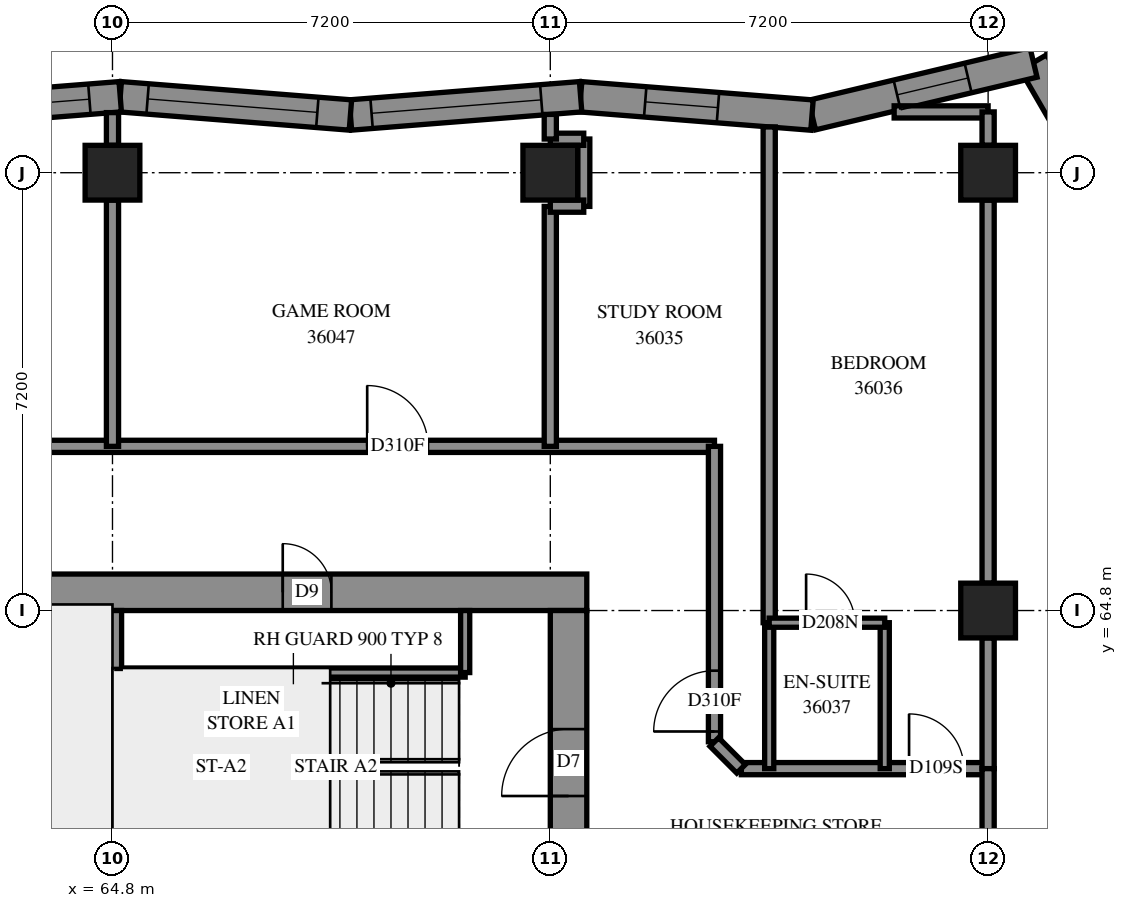
"""IFC4 building model, lengths in metres.
Left out: names, types, materials, properties, quantities, classifications, styles, units other than length and angle.
Written with IfcOpenShell. Run it as: python <this file> out.ifc"""

import sys

from ifc_helpers import new_model, si_unit, direction, frame, frame_2d, origin, origin_2d, place, context, subcontext, project, spatial, polyline, rectangle, outline, extrude, element, fill, save


model = new_model("IFC4")
c1 = context("Model", 3, precision=1e-05, world=origin(), true_north=direction((0.0, 1.0)))
c2 = subcontext(c1, "Body", "Model", "MODEL_VIEW")
j1 = project(units=[si_unit("LENGTHUNIT", "METRE"), si_unit("PLANEANGLEUNIT", "RADIAN")], contexts=[c1])
p1 = place(None, origin())
s1 = spatial("IfcSite", under=j1, at=p1, CompositionType="ELEMENT")
p2 = place(p1, origin())
s2 = spatial("IfcBuilding", under=s1, at=p2, CompositionType="ELEMENT")
p3 = place(p2, frame((0.0, 0.0, 135.4)))
s3 = spatial("IfcBuildingStorey", under=s2, at=p3, CompositionType="ELEMENT", Elevation=135.4)
for number, where, z_axis, x_axis in (
    (1, (64.8, 72.0, 0.0), (0.0, 0.0, 1.0), (1.0, 0.0, 0.0)),
    (2, (72.0, 72.0, 0.0), (0.0, 0.0, 1.0), (1.0, 0.0, 0.0)),
    (3, (79.2, 64.8, 0.0), (0.0, 0.0, 1.0), (1.0, 0.0, 0.0)),
    (4, (79.2, 72.0, 0.0), (0.0, 0.0, 1.0), (1.0, 0.0, 0.0)),
):
    element("IfcColumn", number, at=place(p3, frame(where, z_axis=z_axis, x_axis=x_axis)), inside=s3, PredefinedType="COLUMN", context=c2, shape_type="SweptSolid", body=[
        extrude(rectangle(XDim=0.9, YDim=0.9, at=origin_2d()), origin(), (0.0, 0.0, 1.0), 3.1),
    ])
p4 = place(p3, frame((57.0, 65.1, -0.3), z_axis=(0.0, 0.0, 1.0), x_axis=(1.0, 0.0, 0.0)))
e5 = element("IfcWall", 5, at=p4, inside=s3, PredefinedType="SHEAR", context=c2, shape_type="SweptSolid", body=[
    extrude(rectangle(XDim=15.6, YDim=0.6, at=frame_2d((7.8, 0.0))), origin(), (0.0, 0.0, 1.0), 2.7),
])
p5 = place(p4, frame((10.6, 0.0, 0.3)))
e6 = element("IfcOpeningElement", 6, at=p5, cuts=e5, PredefinedType="OPENING", context=c2, shape_type="SweptSolid", body=[
    extrude(rectangle(XDim=0.8, YDim=2.1, at=frame_2d((0.4, 1.05))), frame((0.0, 0.31, 0.0), z_axis=(0.0, -1.0, 0.0), x_axis=(1.0, 0.0, 0.0)), (0.0, 0.0, 1.0), 0.62),
])
p6 = place(p3, frame((72.3, 50.4, -0.3), z_axis=(0.0, 0.0, 1.0), x_axis=(0.0, 1.0, 0.0)))
e7 = element("IfcWall", 7, at=p6, inside=s3, PredefinedType="SHEAR", context=c2, shape_type="SweptSolid", body=[
    extrude(rectangle(XDim=14.4, YDim=0.6, at=frame_2d((7.2, 0.0))), origin(), (0.0, 0.0, 1.0), 2.7),
])
p7 = place(p6, frame((4.55, 0.0, 0.3)))
e8 = element("IfcOpeningElement", 8, at=p7, cuts=e7, PredefinedType="OPENING", context=c2, shape_type="SweptSolid", body=[
    extrude(rectangle(XDim=1.1, YDim=2.1, at=frame_2d((0.55, 1.05))), frame((0.0, 0.31, 0.0), z_axis=(0.0, -1.0, 0.0), x_axis=(1.0, 0.0, 0.0)), (0.0, 0.0, 1.0), 0.62),
])
p8 = place(p6, frame((11.35, 0.0, 0.3)))
e9 = element("IfcOpeningElement", 9, at=p8, cuts=e7, PredefinedType="OPENING", context=c2, shape_type="SweptSolid", body=[
    extrude(rectangle(XDim=1.1, YDim=2.1, at=frame_2d((0.55, 1.05))), frame((0.0, 0.31, 0.0), z_axis=(0.0, -1.0, 0.0), x_axis=(1.0, 0.0, 0.0)), (0.0, 0.0, 1.0), 0.62),
])
p9 = place(p3, frame((64.8, 60.6, 0.0), z_axis=(0.0, 0.0, 1.0), x_axis=(0.0, 1.0, 0.0)))
e10 = element("IfcWall", 10, at=p9, inside=s3, PredefinedType="SOLIDWALL", context=c2, shape_type="SweptSolid", body=[
    extrude(rectangle(XDim=4.2, YDim=0.3, at=frame_2d((2.1, 0.0))), origin(), (0.0, 0.0, 1.0), 3.1),
])
p10 = place(p3, frame((81.624, 70.915, 0.0), z_axis=(0.0, 0.0, 1.0), x_axis=(-0.500878516, 0.8655175979, 0.0)))
e11 = element("IfcWall", 11, at=p10, inside=s3, PredefinedType="SOLIDWALL", context=c2, shape_type="SweptSolid", body=[
    extrude(outline(polyline([(0.044, -0.25), (3.535, -0.25), (3.163, 0.25), (-0.044, 0.25), (0.044, -0.25)])), origin(), (0.0, 0.0, 1.0), 3.1),
])
p11 = place(p10, frame((0.784, 0.0, 0.45)))
e12 = element("IfcOpeningElement", 12, at=p11, cuts=e11, PredefinedType="OPENING", context=c2, shape_type="SweptSolid", body=[
    extrude(rectangle(XDim=1.2, YDim=2.5, at=frame_2d((0.6, 1.25))), frame((0.0, 0.26, 0.0), z_axis=(0.0, -1.0, 0.0), x_axis=(1.0, 0.0, 0.0)), (0.0, 0.0, 1.0), 0.52),
])
p12 = place(p3, frame((79.947, 73.814, 0.0), z_axis=(0.0, 0.0, 1.0), x_axis=(-0.9728878208, -0.2312775132, 0.0)))
e13 = element("IfcWall", 13, at=p12, inside=s3, PredefinedType="SOLIDWALL", context=c2, shape_type="SweptSolid", body=[
    extrude(outline(polyline([(-0.186, -0.25), (3.705, -0.25), (3.784, 0.25), (0.186, 0.25), (-0.186, -0.25)])), origin(), (0.0, 0.0, 1.0), 3.1),
])
p13 = place(p12, frame((1.106, 0.0, 0.45)))
e14 = element("IfcOpeningElement", 14, at=p13, cuts=e13, PredefinedType="OPENING", context=c2, shape_type="SweptSolid", body=[
    extrude(rectangle(XDim=1.2, YDim=2.5, at=frame_2d((0.6, 1.25))), frame((0.0, 0.26, 0.0), z_axis=(0.0, -1.0, 0.0), x_axis=(1.0, 0.0, 0.0)), (0.0, 0.0, 1.0), 0.52),
])
p14 = place(p3, frame((76.304, 72.948, 0.0), z_axis=(0.0, 0.0, 1.0), x_axis=(-0.9968755515, 0.0789881945, 0.0)))
e15 = element("IfcWall", 15, at=p14, inside=s3, PredefinedType="SOLIDWALL", context=c2, shape_type="SweptSolid", body=[
    extrude(outline(polyline([(0.039, -0.25), (3.837, -0.25), (3.797, 0.25), (-0.039, 0.25), (0.039, -0.25)])), origin(), (0.0, 0.0, 1.0), 3.1),
])
p15 = place(p14, frame((1.552, 0.0, 0.45)))
e16 = element("IfcOpeningElement", 16, at=p15, cuts=e15, PredefinedType="OPENING", context=c2, shape_type="SweptSolid", body=[
    extrude(rectangle(XDim=1.2, YDim=2.5, at=frame_2d((0.6, 1.25))), frame((0.0, 0.26, 0.0), z_axis=(0.0, -1.0, 0.0), x_axis=(1.0, 0.0, 0.0)), (0.0, 0.0, 1.0), 0.52),
])
p16 = place(p3, frame((72.499, 73.249, 0.0), z_axis=(0.0, 0.0, 1.0), x_axis=(-0.9968747806, -0.0789979222, 0.0)))
e17 = element("IfcWall", 17, at=p16, inside=s3, PredefinedType="SOLIDWALL", context=c2, shape_type="SweptSolid", body=[
    extrude(outline(polyline([(-0.02, -0.25), (3.778, -0.25), (3.817, 0.25), (0.02, 0.25), (-0.02, -0.25)])), origin(), (0.0, 0.0, 1.0), 3.1),
])
p17 = place(p16, frame((0.649, 0.0, 0.45)))
e18 = element("IfcOpeningElement", 18, at=p17, cuts=e17, PredefinedType="OPENING", context=c2, shape_type="SweptSolid", body=[
    extrude(rectangle(XDim=2.8, YDim=2.5, at=frame_2d((1.4, 1.25))), frame((0.0, 0.26, 0.0), z_axis=(0.0, -1.0, 0.0), x_axis=(1.0, 0.0, 0.0)), (0.0, 0.0, 1.0), 0.52),
])
p18 = place(p3, frame((68.713, 72.949, 0.0), z_axis=(0.0, 0.0, 1.0), x_axis=(-0.9968746163, 0.078999996, 0.0)))
e19 = element("IfcWall", 19, at=p18, inside=s3, PredefinedType="SOLIDWALL", context=c2, shape_type="SweptSolid", body=[
    extrude(outline(polyline([(0.02, -0.25), (3.817, -0.25), (3.778, 0.25), (-0.02, 0.25), (0.02, -0.25)])), origin(), (0.0, 0.0, 1.0), 3.1),
])
p19 = place(p18, frame((0.546, 0.0, 0.45)))
e20 = element("IfcOpeningElement", 20, at=p19, cuts=e19, PredefinedType="OPENING", context=c2, shape_type="SweptSolid", body=[
    extrude(rectangle(XDim=2.8, YDim=2.5, at=frame_2d((1.4, 1.25))), frame((0.0, 0.26, 0.0), z_axis=(0.0, -1.0, 0.0), x_axis=(1.0, 0.0, 0.0)), (0.0, 0.0, 1.0), 0.52),
])
p20 = place(p3, frame((64.927, 73.249, 0.0), z_axis=(0.0, 0.0, 1.0), x_axis=(-0.9968746163, -0.078999996, 0.0)))
e21 = element("IfcWall", 21, at=p20, inside=s3, PredefinedType="SOLIDWALL", context=c2, shape_type="SweptSolid", body=[
    extrude(outline(polyline([(-0.02, -0.25), (3.778, -0.25), (3.817, 0.25), (0.02, 0.25), (-0.02, -0.25)])), origin(), (0.0, 0.0, 1.0), 3.1),
])
p21 = place(p20, frame((0.509, 0.0, 0.45)))
e22 = element("IfcOpeningElement", 22, at=p21, cuts=e21, PredefinedType="OPENING", context=c2, shape_type="SweptSolid", body=[
    extrude(rectangle(XDim=2.8, YDim=2.5, at=frame_2d((1.4, 1.25))), frame((0.0, 0.26, 0.0), z_axis=(0.0, -1.0, 0.0), x_axis=(1.0, 0.0, 0.0)), (0.0, 0.0, 1.0), 0.52),
])
p22 = place(p3, frame((64.95, 63.78, 0.0), z_axis=(0.0, 0.0, 1.0), x_axis=(1.0, 0.0, 0.0)))
e23 = element("IfcWall", 23, at=p22, inside=s3, PredefinedType="PARTITIONING", context=c2, shape_type="SweptSolid", body=[
    extrude(rectangle(XDim=5.65, YDim=0.15, at=frame_2d((2.825, 0.0))), origin(), (0.0, 0.0, 1.0), 3.1),
])
p23 = place(p3, frame((70.6, 63.78, 0.0), z_axis=(0.0, 0.0, 1.0), x_axis=(0.0, 1.0, 0.0)))
e24 = element("IfcWall", 24, at=p23, inside=s3, PredefinedType="PARTITIONING", context=c2, shape_type="SweptSolid", body=[
    extrude(rectangle(XDim=1.02, YDim=0.15, at=frame_2d((0.51, 0.0))), origin(), (0.0, 0.0, 1.0), 3.1),
])
p24 = place(p3, frame((54.9, 67.5, 0.0), z_axis=(0.0, 0.0, 1.0), x_axis=(1.0, 0.0, 0.0)))
e25 = element("IfcWall", 25, at=p24, inside=s3, PredefinedType="PARTITIONING", context=c2, shape_type="SweptSolid", body=[
    extrude(rectangle(XDim=19.8, YDim=0.2, at=frame_2d((9.9, 0.0))), origin(), (0.0, 0.0, 1.0), 3.1),
])
p25 = place(p24, frame((6.562, 0.0, 0.0)))
e26 = element("IfcOpeningElement", 26, at=p25, cuts=e25, PredefinedType="OPENING", context=c2, shape_type="SweptSolid", body=[
    extrude(rectangle(XDim=1.0, YDim=2.1, at=frame_2d((0.5, 1.05))), frame((0.0, 0.11, 0.0), z_axis=(0.0, -1.0, 0.0), x_axis=(1.0, 0.0, 0.0)), (0.0, 0.0, 1.0), 0.22),
])
p26 = place(p24, frame((14.089, 0.0, 0.0)))
e27 = element("IfcOpeningElement", 27, at=p26, cuts=e25, PredefinedType="OPENING", context=c2, shape_type="SweptSolid", body=[
    extrude(rectangle(XDim=1.0, YDim=2.1, at=frame_2d((0.5, 1.05))), frame((0.0, 0.11, 0.0), z_axis=(0.0, -1.0, 0.0), x_axis=(1.0, 0.0, 0.0)), (0.0, 0.0, 1.0), 0.22),
])
p27 = place(p3, frame((75.6, 64.6, 0.0), z_axis=(0.0, 0.0, 1.0), x_axis=(0.0, 1.0, 0.0)))
e28 = element("IfcWall", 28, at=p27, inside=s3, PredefinedType="PARTITIONING", context=c2, shape_type="SweptSolid", body=[
    extrude(rectangle(XDim=8.153, YDim=0.2, at=frame_2d((4.076, 0.0))), origin(), (0.0, 0.0, 1.0), 3.1),
])
p28 = place(p3, frame((79.2, 65.25, 0.0), z_axis=(0.0, 0.0, 1.0), x_axis=(0.0, 1.0, 0.0)))
e29 = element("IfcWall", 29, at=p28, inside=s3, PredefinedType="PARTITIONING", context=c2, shape_type="SweptSolid", body=[
    extrude(rectangle(XDim=6.3, YDim=0.2, at=frame_2d((3.15, 0.0))), origin(), (0.0, 0.0, 1.0), 3.1),
])
p29 = place(p3, frame((74.7, 62.642, 0.0), z_axis=(0.0, 0.0, 1.0), x_axis=(0.0, 1.0, 0.0)))
e30 = element("IfcWall", 30, at=p29, inside=s3, PredefinedType="PARTITIONING", context=c2, shape_type="SweptSolid", body=[
    extrude(rectangle(XDim=4.858, YDim=0.2, at=frame_2d((2.429, 0.0))), origin(), (0.0, 0.0, 1.0), 3.1),
])
p30 = place(p29, frame((0.169, 0.0, 0.0)))
e31 = element("IfcOpeningElement", 31, at=p30, cuts=e30, PredefinedType="OPENING", context=c2, shape_type="SweptSolid", body=[
    extrude(rectangle(XDim=1.0, YDim=2.1, at=frame_2d((0.5, 1.05))), frame((0.0, 0.11, 0.0), z_axis=(0.0, -1.0, 0.0), x_axis=(1.0, 0.0, 0.0)), (0.0, 0.0, 1.0), 0.22),
])
p31 = place(p3, frame((75.142, 62.2, 0.0), z_axis=(0.0, 0.0, 1.0), x_axis=(1.0, 0.0, 0.0)))
e32 = element("IfcWall", 32, at=p31, inside=s3, PredefinedType="PARTITIONING", context=c2, shape_type="SweptSolid", body=[
    extrude(rectangle(XDim=4.058, YDim=0.2, at=frame_2d((2.029, 0.0))), origin(), (0.0, 0.0, 1.0), 3.1),
])
p32 = place(p31, frame((2.758, 0.0, 0.0)))
e33 = element("IfcOpeningElement", 33, at=p32, cuts=e32, PredefinedType="OPENING", context=c2, shape_type="SweptSolid", body=[
    extrude(rectangle(XDim=0.9, YDim=2.1, at=frame_2d((0.45, 1.05))), frame((0.0, 0.11, 0.0), z_axis=(0.0, -1.0, 0.0), x_axis=(1.0, 0.0, 0.0)), (0.0, 0.0, 1.0), 0.22),
])
p33 = place(p3, frame((64.8, 67.5, 0.0), z_axis=(0.0, 0.0, 1.0), x_axis=(0.0, 1.0, 0.0)))
e34 = element("IfcWall", 34, at=p33, inside=s3, PredefinedType="PARTITIONING", context=c2, shape_type="SweptSolid", body=[
    extrude(rectangle(XDim=4.05, YDim=0.2, at=frame_2d((2.025, 0.0))), origin(), (0.0, 0.0, 1.0), 3.1),
])
p34 = place(p3, frame((72.0, 67.5, 0.0), z_axis=(0.0, 0.0, 1.0), x_axis=(0.0, 1.0, 0.0)))
e35 = element("IfcWall", 35, at=p34, inside=s3, PredefinedType="PARTITIONING", context=c2, shape_type="SweptSolid", body=[
    extrude(rectangle(XDim=3.946, YDim=0.2, at=frame_2d((1.973, 0.0))), origin(), (0.0, 0.0, 1.0), 3.1),
])
for number, where, z_axis, x_axis in (
    (36, (75.6, 62.2, 0.0), (0.0, 0.0, 1.0), (0.0, 1.0, 0.0)),
    (37, (77.5, 62.2, 0.0), (0.0, 0.0, 1.0), (0.0, 1.0, 0.0)),
):
    element("IfcWall", number, at=place(p3, frame(where, z_axis=z_axis, x_axis=x_axis)), inside=s3, PredefinedType="PARTITIONING", context=c2, shape_type="SweptSolid", body=[
        extrude(rectangle(XDim=2.4, YDim=0.15, at=frame_2d((1.2, 0.0))), origin(), (0.0, 0.0, 1.0), 3.1),
    ])
p35 = place(p3, frame((79.2, 62.2, 0.0), z_axis=(0.0, 0.0, 1.0), x_axis=(0.0, 1.0, 0.0)))
e38 = element("IfcWall", 38, at=p35, inside=s3, PredefinedType="PARTITIONING", context=c2, shape_type="SweptSolid", body=[
    extrude(rectangle(XDim=2.15, YDim=0.2, at=frame_2d((1.075, 0.0))), origin(), (0.0, 0.0, 1.0), 3.1),
])
p36 = place(p3, frame((79.2, 60.2, 0.0), z_axis=(0.0, 0.0, 1.0), x_axis=(0.0, 1.0, 0.0)))
e39 = element("IfcWall", 39, at=p36, inside=s3, PredefinedType="PARTITIONING", context=c2, shape_type="SweptSolid", body=[
    extrude(rectangle(XDim=2.0, YDim=0.2, at=frame_2d((1.0, 0.0))), origin(), (0.0, 0.0, 1.0), 3.1),
])
p37 = place(p3, frame((75.6, 64.6, 0.0), z_axis=(0.0, 0.0, 1.0), x_axis=(1.0, 0.0, 0.0)))
e40 = element("IfcWall", 40, at=p37, inside=s3, PredefinedType="PARTITIONING", context=c2, shape_type="SweptSolid", body=[
    extrude(rectangle(XDim=1.9, YDim=0.15, at=frame_2d((0.95, 0.0))), origin(), (0.0, 0.0, 1.0), 3.1),
])
p38 = place(p37, frame((0.607, 0.0, 0.0)))
e41 = element("IfcOpeningElement", 41, at=p38, cuts=e40, PredefinedType="OPENING", context=c2, shape_type="SweptSolid", body=[
    extrude(rectangle(XDim=0.8, YDim=2.1, at=frame_2d((0.4, 1.05))), frame((0.0, 0.085, 0.0), z_axis=(0.0, -1.0, 0.0), x_axis=(1.0, 0.0, 0.0)), (0.0, 0.0, 1.0), 0.17),
])
p39 = place(p3, frame((77.655, 73.0, 0.0), z_axis=(0.0, 0.0, 1.0), x_axis=(1.0, 0.0, 0.0)))
e42 = element("IfcWall", 42, at=p39, inside=s3, PredefinedType="PARTITIONING", context=c2, shape_type="SweptSolid", body=[
    extrude(rectangle(XDim=1.545, YDim=0.2, at=frame_2d((0.773, 0.0))), origin(), (0.0, 0.0, 1.0), 3.1),
])
p40 = place(p3, frame((72.55, 71.446, 0.0), z_axis=(0.0, 0.0, 1.0), x_axis=(0.0, 1.0, 0.0)))
e43 = element("IfcWall", 43, at=p40, inside=s3, PredefinedType="PARTITIONING", context=c2, shape_type="SweptSolid", body=[
    extrude(rectangle(XDim=1.108, YDim=0.2, at=frame_2d((0.554, 0.0))), origin(), (0.0, 0.0, 1.0), 3.1),
])
p41 = place(p3, frame((74.697, 62.637, 0.0), z_axis=(0.0, 0.0, 1.0), x_axis=(0.7071067812, -0.7071067812, 0.0)))
e44 = element("IfcWall", 44, at=p41, inside=s3, PredefinedType="PARTITIONING", context=c2, shape_type="SweptSolid", body=[
    extrude(rectangle(XDim=0.622, YDim=0.2, at=frame_2d((0.311, 0.0))), origin(), (0.0, 0.0, 1.0), 3.1),
])
for number, where, z_axis, x_axis in (
    (45, (72.0, 71.45, 0.0), (0.0, 0.0, 1.0), (1.0, 0.0, 0.0)),
    (46, (72.0, 72.55, 0.0), (0.0, 0.0, 1.0), (1.0, 0.0, 0.0)),
    (47, (79.2, 72.45, 0.0), (0.0, 0.0, 1.0), (0.0, 1.0, 0.0)),
):
    element("IfcWall", number, at=place(p3, frame(where, z_axis=z_axis, x_axis=x_axis)), inside=s3, PredefinedType="PARTITIONING", context=c2, shape_type="SweptSolid", body=[
        extrude(rectangle(XDim=0.55, YDim=0.2, at=frame_2d((0.275, 0.0))), origin(), (0.0, 0.0, 1.0), 3.1),
    ])
p42 = place(p3, frame((64.8, 72.45, 0.0), z_axis=(0.0, 0.0, 1.0), x_axis=(0.0, 1.0, 0.0)))
e48 = element("IfcWall", 48, at=p42, inside=s3, PredefinedType="PARTITIONING", context=c2, shape_type="SweptSolid", body=[
    extrude(rectangle(XDim=0.538, YDim=0.2, at=frame_2d((0.269, 0.0))), origin(), (0.0, 0.0, 1.0), 3.1),
])
p43 = place(p3, frame((72.0, 72.554, 0.0), z_axis=(0.0, 0.0, 1.0), x_axis=(0.0, 1.0, 0.0)))
e49 = element("IfcWall", 49, at=p43, inside=s3, PredefinedType="PARTITIONING", context=c2, shape_type="SweptSolid", body=[
    extrude(rectangle(XDim=0.405, YDim=0.2, at=frame_2d((0.202, 0.0))), origin(), (0.0, 0.0, 1.0), 3.1),
])
p44 = place(p13, origin())
e50 = element("IfcWindow", 50, at=p44, inside=s3, PartitioningType="SINGLE_PANEL", PredefinedType="WINDOW", context=c2, shape_type="SweptSolid", body=[
    extrude(rectangle(XDim=1.2, YDim=2.5, at=frame_2d((0.6, 1.25))), frame((0.0, 0.15, 0.0), z_axis=(0.0, -1.0, 0.0), x_axis=(1.0, 0.0, 0.0)), (0.0, 0.0, 1.0), 0.06),
])
fill(e14, e50)
p45 = place(p15, origin())
e51 = element("IfcWindow", 51, at=p45, inside=s3, PartitioningType="SINGLE_PANEL", PredefinedType="WINDOW", context=c2, shape_type="SweptSolid", body=[
    extrude(rectangle(XDim=1.2, YDim=2.5, at=frame_2d((0.6, 1.25))), frame((0.0, 0.18, 0.0), z_axis=(0.0, -1.0, 0.0), x_axis=(1.0, 0.0, 0.0)), (0.0, 0.0, 1.0), 0.06),
])
fill(e16, e51)
p46 = place(p17, origin())
e52 = element("IfcWindow", 52, at=p46, inside=s3, PartitioningType="SINGLE_PANEL", PredefinedType="WINDOW", context=c2, shape_type="SweptSolid", body=[
    extrude(rectangle(XDim=2.8, YDim=2.5, at=frame_2d((1.4, 1.25))), frame((0.0, 0.18, 0.0), z_axis=(0.0, -1.0, 0.0), x_axis=(1.0, 0.0, 0.0)), (0.0, 0.0, 1.0), 0.06),
])
fill(e18, e52)
p47 = place(p19, origin())
e53 = element("IfcWindow", 53, at=p47, inside=s3, PartitioningType="SINGLE_PANEL", PredefinedType="WINDOW", context=c2, shape_type="SweptSolid", body=[
    extrude(rectangle(XDim=2.8, YDim=2.5, at=frame_2d((1.4, 1.25))), frame((0.0, 0.18, 0.0), z_axis=(0.0, -1.0, 0.0), x_axis=(1.0, 0.0, 0.0)), (0.0, 0.0, 1.0), 0.06),
])
fill(e20, e53)
p48 = place(p21, origin())
e54 = element("IfcWindow", 54, at=p48, inside=s3, PartitioningType="SINGLE_PANEL", PredefinedType="WINDOW", context=c2, shape_type="SweptSolid", body=[
    extrude(rectangle(XDim=2.8, YDim=2.5, at=frame_2d((1.4, 1.25))), frame((0.0, 0.18, 0.0), z_axis=(0.0, -1.0, 0.0), x_axis=(1.0, 0.0, 0.0)), (0.0, 0.0, 1.0), 0.06),
])
fill(e22, e54)
p49 = place(p5, origin())
e55 = element("IfcDoor", 55, at=p49, inside=s3, OperationType="SINGLE_SWING_RIGHT", PredefinedType="DOOR", context=c2, shape_type="SweptSolid", body=[
    extrude(rectangle(XDim=0.8, YDim=2.1, at=frame_2d((0.4, 1.05))), frame((0.0, 0.025, 0.0), z_axis=(0.0, -1.0, 0.0), x_axis=(1.0, 0.0, 0.0)), (0.0, 0.0, 1.0), 0.05),
])
fill(e6, e55)
p50 = place(p8, origin())
e56 = element("IfcDoor", 56, at=p50, inside=s3, OperationType="SINGLE_SWING_RIGHT", PredefinedType="DOOR", context=c2, shape_type="SweptSolid", body=[
    extrude(rectangle(XDim=1.1, YDim=2.1, at=frame_2d((0.55, 1.05))), frame((0.0, 0.025, 0.0), z_axis=(0.0, -1.0, 0.0), x_axis=(1.0, 0.0, 0.0)), (0.0, 0.0, 1.0), 0.05),
])
fill(e9, e56)
p51 = place(p30, origin())
e57 = element("IfcDoor", 57, at=p51, inside=s3, OperationType="SINGLE_SWING_RIGHT", PredefinedType="DOOR", context=c2, shape_type="SweptSolid", body=[
    extrude(rectangle(XDim=1.0, YDim=2.1, at=frame_2d((0.5, 1.05))), frame((0.0, 0.025, 0.0), z_axis=(0.0, -1.0, 0.0), x_axis=(1.0, 0.0, 0.0)), (0.0, 0.0, 1.0), 0.05),
])
fill(e31, e57)
p52 = place(p32, origin())
e58 = element("IfcDoor", 58, at=p52, inside=s3, OperationType="SINGLE_SWING_LEFT", PredefinedType="DOOR", context=c2, shape_type="SweptSolid", body=[
    extrude(rectangle(XDim=0.9, YDim=2.1, at=frame_2d((0.45, 1.05))), frame((0.0, 0.025, 0.0), z_axis=(0.0, -1.0, 0.0), x_axis=(1.0, 0.0, 0.0)), (0.0, 0.0, 1.0), 0.05),
])
fill(e33, e58)
p53 = place(p38, origin())
e59 = element("IfcDoor", 59, at=p53, inside=s3, OperationType="SINGLE_SWING_RIGHT", PredefinedType="DOOR", context=c2, shape_type="SweptSolid", body=[
    extrude(rectangle(XDim=0.8, YDim=2.1, at=frame_2d((0.4, 1.05))), frame((0.0, 0.025, 0.0), z_axis=(0.0, -1.0, 0.0), x_axis=(1.0, 0.0, 0.0)), (0.0, 0.0, 1.0), 0.05),
])
fill(e41, e59)
p54 = place(p26, origin())
e60 = element("IfcDoor", 60, at=p54, inside=s3, OperationType="SINGLE_SWING_RIGHT", PredefinedType="DOOR", context=c2, shape_type="SweptSolid", body=[
    extrude(rectangle(XDim=1.0, YDim=2.1, at=frame_2d((0.5, 1.05))), frame((0.0, 0.025, 0.0), z_axis=(0.0, -1.0, 0.0), x_axis=(1.0, 0.0, 0.0)), (0.0, 0.0, 1.0), 0.05),
])
fill(e27, e60)
save(model, sys.argv[1])
